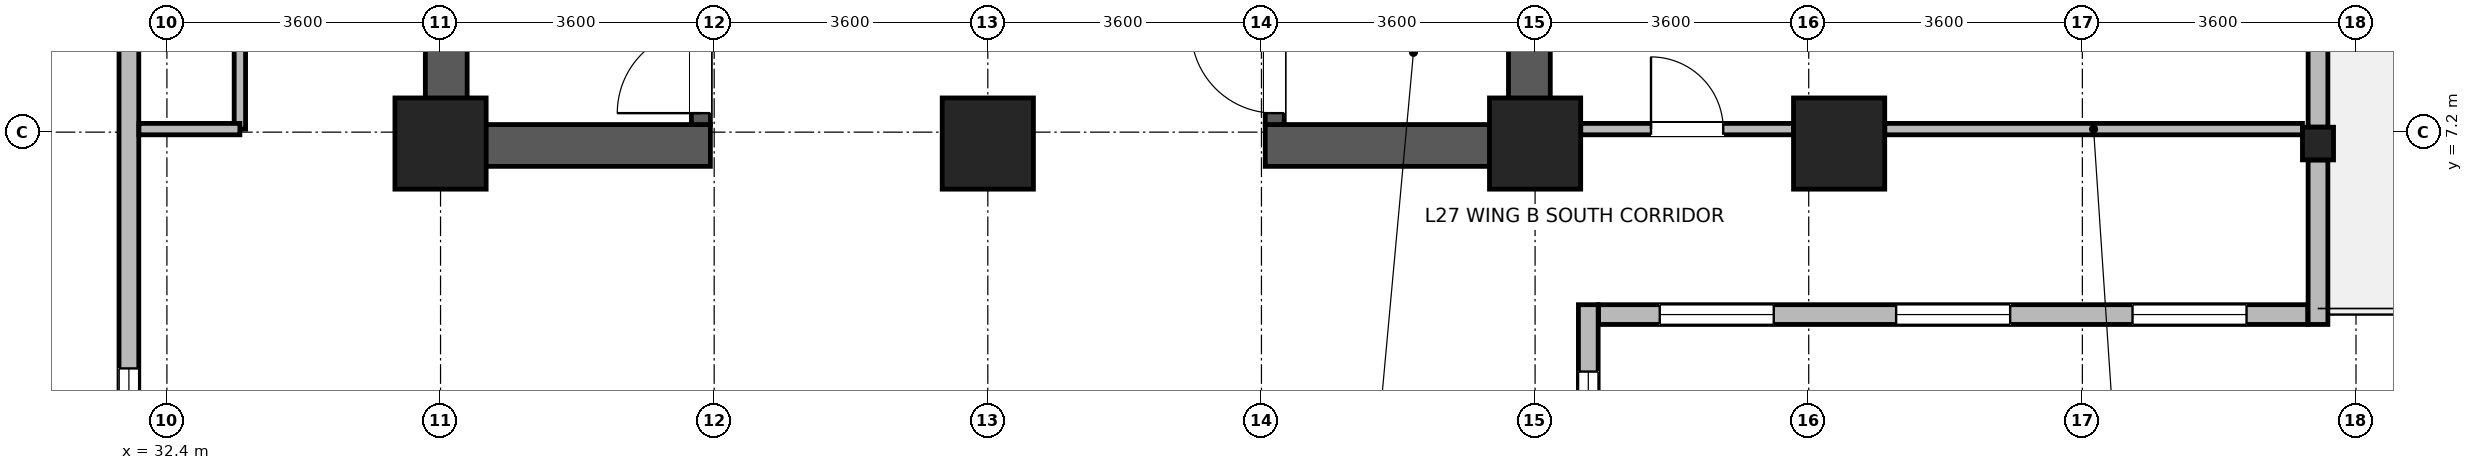
"""IFC4 building model, lengths in metres.
Left out: names, types, materials, properties, quantities, classifications, styles, units other than length and angle.
Written with IfcOpenShell. Run it as: python <this file> out.ifc"""

import sys

from ifc_helpers import new_model, si_unit, direction, frame, frame_2d, origin, origin_2d, place, context, subcontext, project, spatial, rectangle, i_section, extrude, source, transform, mapped, element, fill, save


model = new_model("IFC4")
c1 = context("Model", 3, precision=1e-05, world=origin(), true_north=direction((0.0, 1.0)))
c2 = subcontext(c1, "Body", "Model", "MODEL_VIEW")
j1 = project(units=[si_unit("LENGTHUNIT", "METRE"), si_unit("PLANEANGLEUNIT", "RADIAN")], contexts=[c1])
p1 = place(None, origin())
s1 = spatial("IfcSite", under=j1, at=p1, CompositionType="ELEMENT")
p2 = place(p1, origin())
s2 = spatial("IfcBuilding", under=s1, at=p2, CompositionType="ELEMENT")
p3 = place(p2, frame((0.0, 0.0, 108.2)))
s3 = spatial("IfcBuildingStorey", under=s2, at=p3, CompositionType="ELEMENT", Elevation=108.2)
for number, where, z_axis, x_axis in (
    (1, (36.075, 6.75, 0.0), (0.0, 0.0, 1.0), (0.0, 1.0, 0.0)),
    (2, (50.325, 6.75, 0.0), (0.0, 0.0, 1.0), (0.0, 1.0, 0.0)),
):
    element("IfcWall", number, at=place(p3, frame(where, z_axis=z_axis, x_axis=x_axis)), inside=s3, PredefinedType="SHEAR", context=c2, shape_type="SweptSolid", body=[
        extrude(rectangle(XDim=8.1, YDim=0.55, at=frame_2d((4.05, 0.0))), origin(), (0.0, 0.0, 1.0), 3.45),
    ])
for number, where, z_axis, x_axis in (
    (3, (36.35, 7.025, 0.0), (0.0, 0.0, 1.0), (1.0, 0.0, 0.0)),
    (4, (46.85, 7.025, 0.0), (0.0, 0.0, 1.0), (1.0, 0.0, 0.0)),
):
    element("IfcWall", number, at=place(p3, frame(where, z_axis=z_axis, x_axis=x_axis)), inside=s3, PredefinedType="SHEAR", context=c2, shape_type="SweptSolid", body=[
        extrude(rectangle(XDim=3.2, YDim=0.55, at=frame_2d((1.6, 0.0))), origin(), (0.0, 0.0, 1.0), 3.45),
    ])
p4 = place(p3, frame((39.425, 7.3, 0.0), z_axis=(0.0, 0.0, 1.0), x_axis=(0.0, 1.0, 0.0)))
e5 = element("IfcWall", 5, at=p4, inside=s3, PredefinedType="SHEAR", context=c2, shape_type="SweptSolid", body=[
    extrude(rectangle(XDim=7.0, YDim=0.25, at=frame_2d((3.5, 0.0))), origin(), (0.0, 0.0, 1.0), 3.45),
])
p5 = place(p4, frame((0.15, 0.0, 0.0)))
e6 = element("IfcOpeningElement", 6, at=p5, cuts=e5, PredefinedType="OPENING", context=c2, shape_type="SweptSolid", body=[
    extrude(rectangle(XDim=1.1, YDim=2.08, at=frame_2d((0.55, 1.04))), frame((0.0, 0.135, 0.0), z_axis=(0.0, -1.0, 0.0), x_axis=(1.0, 0.0, 0.0)), (0.0, 0.0, 1.0), 0.27),
])
p6 = place(p3, frame((46.975, 7.3, 0.0), z_axis=(0.0, 0.0, 1.0), x_axis=(0.0, 1.0, 0.0)))
e7 = element("IfcWall", 7, at=p6, inside=s3, PredefinedType="SHEAR", context=c2, shape_type="SweptSolid", body=[
    extrude(rectangle(XDim=7.0, YDim=0.25, at=frame_2d((3.5, 0.0))), origin(), (0.0, 0.0, 1.0), 3.45),
])
p7 = place(p6, frame((0.15, 0.0, 0.0)))
e8 = element("IfcOpeningElement", 8, at=p7, cuts=e7, PredefinedType="OPENING", context=c2, shape_type="SweptSolid", body=[
    extrude(rectangle(XDim=1.1, YDim=2.08, at=frame_2d((0.55, 1.04))), frame((0.0, 0.135, 0.0), z_axis=(0.0, -1.0, 0.0), x_axis=(1.0, 0.0, 0.0)), (0.0, 0.0, 1.0), 0.27),
])
m1 = source(origin(), c2, "Body", "SweptSolid", [
    extrude(rectangle(XDim=1.2, YDim=1.2, at=origin_2d()), origin(), (0.0, 0.0, 1.0), 3.7),
])
for number, where, z_axis, x_axis in (
    (9, (36.0, 7.05, 0.0), (0.0, 0.0, 1.0), (1.0, 0.0, 0.0)),
    (10, (43.2, 7.05, 0.0), (0.0, 0.0, 1.0), (1.0, 0.0, 0.0)),
    (11, (50.4, 7.05, 0.0), (0.0, 0.0, 1.0), (1.0, 0.0, 0.0)),
    (12, (54.4, 7.05, 0.0), (0.0, 0.0, 1.0), (1.0, 0.0, 0.0)),
):
    element("IfcColumn", number, at=place(p3, frame(where, z_axis=z_axis, x_axis=x_axis)), inside=s3, PredefinedType="COLUMN", context=c2, shape_type="MappedRepresentation", body=[
        mapped(m1, transform((0.0, 0.0, 0.0), x_axis=(1.0, 0.0, 0.0), y_axis=(0.0, 1.0, 0.0), z_axis=(0.0, 0.0, 1.0), scale=1.0)),
    ])
m2 = source(origin(), c2, "Body", "SweptSolid", [
    extrude(i_section(OverallWidth=0.409, OverallDepth=0.43, WebThickness=0.024, FlangeThickness=0.033, FilletRadius=0.015, at=origin_2d()), origin(), (0.0, 0.0, 1.0), 3.7),
])
p8 = place(p3, frame((60.7, 7.05, 0.0), z_axis=(0.0, 0.0, 1.0), x_axis=(1.0, 0.0, 0.0)))
e13 = element("IfcColumn", 13, at=p8, inside=s3, PredefinedType="COLUMN", context=c2, shape_type="MappedRepresentation", body=[
    mapped(m2, transform((0.0, 0.0, 0.0), x_axis=(1.0, 0.0, 0.0), y_axis=(0.0, 1.0, 0.0), z_axis=(0.0, 0.0, 1.0), scale=1.0)),
])
p9 = place(p3, frame((51.1, 4.93, 0.0), z_axis=(0.0, 0.0, 1.0), x_axis=(0.0, -1.0, 0.0)))
e14 = element("IfcWall", 14, at=p9, inside=s3, PredefinedType="STANDARD", context=c2, shape_type="SweptSolid", body=[
    extrude(rectangle(XDim=3.26, YDim=0.26, at=frame_2d((1.63, 0.0))), origin(), (0.0, 0.0, 1.0), 3.43),
])
p10 = place(p9, frame((0.88, 0.0, 0.85)))
e15 = element("IfcOpeningElement", 15, at=p10, cuts=e14, PredefinedType="OPENING", context=c2, shape_type="SweptSolid", body=[
    extrude(rectangle(XDim=1.5, YDim=1.85, at=frame_2d((0.75, 0.925))), frame((0.0, 0.14, 0.0), z_axis=(0.0, -1.0, 0.0), x_axis=(1.0, 0.0, 0.0)), (0.0, 0.0, 1.0), 0.28),
])
p11 = place(p3, frame((60.565, 4.8, 0.0), z_axis=(0.0, 0.0, 1.0), x_axis=(-1.0, 0.0, 0.0)))
e16 = element("IfcWall", 16, at=p11, inside=s3, PredefinedType="STANDARD", context=c2, shape_type="SweptSolid", body=[
    extrude(rectangle(XDim=9.33, YDim=0.26, at=frame_2d((4.665, 0.0))), origin(), (0.0, 0.0, 1.0), 3.43),
])
p12 = place(p11, frame((0.805, 0.0, 0.85)))
e17 = element("IfcOpeningElement", 17, at=p12, cuts=e16, PredefinedType="OPENING", context=c2, shape_type="SweptSolid", body=[
    extrude(rectangle(XDim=1.5, YDim=1.85, at=frame_2d((0.75, 0.925))), frame((0.0, 0.14, 0.0), z_axis=(0.0, -1.0, 0.0), x_axis=(1.0, 0.0, 0.0)), (0.0, 0.0, 1.0), 0.28),
])
p13 = place(p11, frame((3.915, 0.0, 0.85)))
e18 = element("IfcOpeningElement", 18, at=p13, cuts=e16, PredefinedType="OPENING", context=c2, shape_type="SweptSolid", body=[
    extrude(rectangle(XDim=1.5, YDim=1.85, at=frame_2d((0.75, 0.925))), frame((0.0, 0.14, 0.0), z_axis=(0.0, -1.0, 0.0), x_axis=(1.0, 0.0, 0.0)), (0.0, 0.0, 1.0), 0.28),
])
p14 = place(p11, frame((7.025, 0.0, 0.85)))
e19 = element("IfcOpeningElement", 19, at=p14, cuts=e16, PredefinedType="OPENING", context=c2, shape_type="SweptSolid", body=[
    extrude(rectangle(XDim=1.5, YDim=1.85, at=frame_2d((0.75, 0.925))), frame((0.0, 0.14, 0.0), z_axis=(0.0, -1.0, 0.0), x_axis=(1.0, 0.0, 0.0)), (0.0, 0.0, 1.0), 0.28),
])
p15 = place(p3, frame((60.7, 6.834, 0.0), z_axis=(0.0, 0.0, 1.0), x_axis=(0.0, -1.0, 0.0)))
e20 = element("IfcWall", 20, at=p15, inside=s3, PredefinedType="STANDARD", context=c2, shape_type="SweptSolid", body=[
    extrude(rectangle(XDim=2.164, YDim=0.26, at=frame_2d((1.082, 0.0))), origin(), (0.0, 0.0, 1.0), 3.43),
])
p16 = place(p3, frame((60.7, 14.334, 0.0), z_axis=(0.0, 0.0, 1.0), x_axis=(0.0, -1.0, 0.0)))
e21 = element("IfcWall", 21, at=p16, inside=s3, PredefinedType="STANDARD", context=c2, shape_type="SweptSolid", body=[
    extrude(rectangle(XDim=7.068, YDim=0.26, at=frame_2d((3.534, 0.0))), origin(), (0.0, 0.0, 1.0), 2.98),
])
p17 = place(p16, frame((2.784, 0.0, 0.0)))
e22 = element("IfcOpeningElement", 22, at=p17, cuts=e21, PredefinedType="OPENING", context=c2, shape_type="SweptSolid", body=[
    extrude(rectangle(XDim=1.5, YDim=2.15, at=frame_2d((0.75, 1.075))), frame((0.0, 0.14, 0.0), z_axis=(0.0, -1.0, 0.0), x_axis=(1.0, 0.0, 0.0)), (0.0, 0.0, 1.0), 0.28),
])
p18 = place(p16, frame((1.017, 0.0, 0.85)))
e23 = element("IfcOpeningElement", 23, at=p18, cuts=e21, PredefinedType="OPENING", context=c2, shape_type="SweptSolid", body=[
    extrude(rectangle(XDim=1.5, YDim=1.85, at=frame_2d((0.75, 0.925))), frame((0.0, 0.14, 0.0), z_axis=(0.0, -1.0, 0.0), x_axis=(1.0, 0.0, 0.0)), (0.0, 0.0, 1.0), 0.28),
])
p19 = place(p16, frame((4.551, 0.0, 0.85)))
e24 = element("IfcOpeningElement", 24, at=p19, cuts=e21, PredefinedType="OPENING", context=c2, shape_type="SweptSolid", body=[
    extrude(rectangle(XDim=1.5, YDim=1.85, at=frame_2d((0.75, 0.925))), frame((0.0, 0.14, 0.0), z_axis=(0.0, -1.0, 0.0), x_axis=(1.0, 0.0, 0.0)), (0.0, 0.0, 1.0), 0.28),
])
p20 = place(p3, frame((31.9, 1.67, 0.0), z_axis=(0.0, 0.0, 1.0), x_axis=(0.0, 1.0, 0.0)))
e25 = element("IfcWall", 25, at=p20, inside=s3, PredefinedType="STANDARD", context=c2, shape_type="SweptSolid", body=[
    extrude(rectangle(XDim=20.06, YDim=0.26, at=frame_2d((10.03, 0.0))), origin(), (0.0, 0.0, 1.0), 3.43),
])
p21 = place(p20, frame((0.922, 0.0, 0.85)))
e26 = element("IfcOpeningElement", 26, at=p21, cuts=e25, PredefinedType="OPENING", context=c2, shape_type="SweptSolid", body=[
    extrude(rectangle(XDim=1.5, YDim=1.85, at=frame_2d((0.75, 0.925))), frame((0.0, 0.14, 0.0), z_axis=(0.0, -1.0, 0.0), x_axis=(1.0, 0.0, 0.0)), (0.0, 0.0, 1.0), 0.28),
])
p22 = place(p20, frame((7.608, 0.0, 0.85)))
e27 = element("IfcOpeningElement", 27, at=p22, cuts=e25, PredefinedType="OPENING", context=c2, shape_type="SweptSolid", body=[
    extrude(rectangle(XDim=1.5, YDim=1.85, at=frame_2d((0.75, 0.925))), frame((0.0, 0.14, 0.0), z_axis=(0.0, -1.0, 0.0), x_axis=(1.0, 0.0, 0.0)), (0.0, 0.0, 1.0), 0.28),
])
p23 = place(p20, frame((10.952, 0.0, 0.85)))
e28 = element("IfcOpeningElement", 28, at=p23, cuts=e25, PredefinedType="OPENING", context=c2, shape_type="SweptSolid", body=[
    extrude(rectangle(XDim=1.5, YDim=1.85, at=frame_2d((0.75, 0.925))), frame((0.0, 0.14, 0.0), z_axis=(0.0, -1.0, 0.0), x_axis=(1.0, 0.0, 0.0)), (0.0, 0.0, 1.0), 0.28),
])
p24 = place(p20, frame((14.295, 0.0, 0.85)))
e29 = element("IfcOpeningElement", 29, at=p24, cuts=e25, PredefinedType="OPENING", context=c2, shape_type="SweptSolid", body=[
    extrude(rectangle(XDim=1.5, YDim=1.85, at=frame_2d((0.75, 0.925))), frame((0.0, 0.14, 0.0), z_axis=(0.0, -1.0, 0.0), x_axis=(1.0, 0.0, 0.0)), (0.0, 0.0, 1.0), 0.28),
])
p25 = place(p20, frame((17.638, 0.0, 0.85)))
e30 = element("IfcOpeningElement", 30, at=p25, cuts=e25, PredefinedType="OPENING", context=c2, shape_type="SweptSolid", body=[
    extrude(rectangle(XDim=1.5, YDim=1.85, at=frame_2d((0.75, 0.925))), frame((0.0, 0.14, 0.0), z_axis=(0.0, -1.0, 0.0), x_axis=(1.0, 0.0, 0.0)), (0.0, 0.0, 1.0), 0.28),
])
p26 = place(p3, frame((51.0, 7.24, 0.0), z_axis=(0.0, 0.0, 1.0), x_axis=(1.0, 0.0, 0.0)))
e31 = element("IfcWall", 31, at=p26, inside=s3, PredefinedType="PARTITIONING", context=c2, shape_type="SweptSolid", body=[
    extrude(rectangle(XDim=2.8, YDim=0.15, at=frame_2d((1.4, 0.0))), origin(), (0.0, 0.0, 1.0), 2.78),
])
p27 = place(p26, frame((0.925, 0.0, 0.0)))
e32 = element("IfcOpeningElement", 32, at=p27, cuts=e31, PredefinedType="OPENING", context=c2, shape_type="SweptSolid", body=[
    extrude(rectangle(XDim=0.95, YDim=2.1, at=frame_2d((0.475, 1.05))), frame((0.0, 0.085, 0.0), z_axis=(0.0, -1.0, 0.0), x_axis=(1.0, 0.0, 0.0)), (0.0, 0.0, 1.0), 0.17),
])
p28 = place(p3, frame((55.0, 7.24, 0.0), z_axis=(0.0, 0.0, 1.0), x_axis=(1.0, 0.0, 0.0)))
e33 = element("IfcWall", 33, at=p28, inside=s3, PredefinedType="PARTITIONING", context=c2, shape_type="SweptSolid", body=[
    extrude(rectangle(XDim=5.496, YDim=0.15, at=frame_2d((2.748, 0.0))), origin(), (0.0, 0.0, 1.0), 2.78),
])
p29 = place(p3, frame((33.36, 7.24, 0.0), z_axis=(0.0, 0.0, 1.0), x_axis=(0.0, 1.0, 0.0)))
e34 = element("IfcWall", 34, at=p29, inside=s3, PredefinedType="PARTITIONING", context=c2, shape_type="SweptSolid", body=[
    extrude(rectangle(XDim=7.26, YDim=0.15, at=frame_2d((3.63, 0.0))), origin(), (0.0, 0.0, 1.0), 3.43),
])
p30 = place(p29, frame((2.98, 0.0, 0.0)))
e35 = element("IfcOpeningElement", 35, at=p30, cuts=e34, PredefinedType="OPENING", context=c2, shape_type="SweptSolid", body=[
    extrude(rectangle(XDim=1.3, YDim=2.12, at=frame_2d((0.65, 1.06))), frame((0.0, 0.085, 0.0), z_axis=(0.0, -1.0, 0.0), x_axis=(1.0, 0.0, 0.0)), (0.0, 0.0, 1.0), 0.17),
])
p31 = place(p3, frame((32.032, 7.24, 0.0), z_axis=(0.0, 0.0, 1.0), x_axis=(1.0, 0.0, 0.0)))
e36 = element("IfcWall", 36, at=p31, inside=s3, PredefinedType="PARTITIONING", context=c2, shape_type="SweptSolid", body=[
    extrude(rectangle(XDim=1.328, YDim=0.15, at=frame_2d((0.664, 0.0))), origin(), (0.0, 0.0, 1.0), 3.43),
])
p32 = place(p10, origin())
e37 = element("IfcWindow", 37, at=p32, inside=s3, PartitioningType="SINGLE_PANEL", PredefinedType="WINDOW", context=c2, shape_type="SweptSolid", body=[
    extrude(rectangle(XDim=1.5, YDim=1.85, at=frame_2d((0.75, 0.925))), frame((0.0, 0.03, 0.0), z_axis=(0.0, -1.0, 0.0), x_axis=(1.0, 0.0, 0.0)), (0.0, 0.0, 1.0), 0.06),
])
fill(e15, e37)
p33 = place(p12, origin())
e38 = element("IfcWindow", 38, at=p33, inside=s3, PartitioningType="SINGLE_PANEL", PredefinedType="WINDOW", context=c2, shape_type="SweptSolid", body=[
    extrude(rectangle(XDim=1.5, YDim=1.85, at=frame_2d((0.75, 0.925))), frame((0.0, 0.03, 0.0), z_axis=(0.0, -1.0, 0.0), x_axis=(1.0, 0.0, 0.0)), (0.0, 0.0, 1.0), 0.06),
])
fill(e17, e38)
p34 = place(p13, origin())
e39 = element("IfcWindow", 39, at=p34, inside=s3, PartitioningType="SINGLE_PANEL", PredefinedType="WINDOW", context=c2, shape_type="SweptSolid", body=[
    extrude(rectangle(XDim=1.5, YDim=1.85, at=frame_2d((0.75, 0.925))), frame((0.0, 0.03, 0.0), z_axis=(0.0, -1.0, 0.0), x_axis=(1.0, 0.0, 0.0)), (0.0, 0.0, 1.0), 0.06),
])
fill(e18, e39)
p35 = place(p14, origin())
e40 = element("IfcWindow", 40, at=p35, inside=s3, PartitioningType="SINGLE_PANEL", PredefinedType="WINDOW", context=c2, shape_type="SweptSolid", body=[
    extrude(rectangle(XDim=1.5, YDim=1.85, at=frame_2d((0.75, 0.925))), frame((0.0, 0.03, 0.0), z_axis=(0.0, -1.0, 0.0), x_axis=(1.0, 0.0, 0.0)), (0.0, 0.0, 1.0), 0.06),
])
fill(e19, e40)
p36 = place(p21, origin())
e41 = element("IfcWindow", 41, at=p36, inside=s3, PartitioningType="SINGLE_PANEL", PredefinedType="WINDOW", context=c2, shape_type="SweptSolid", body=[
    extrude(rectangle(XDim=1.5, YDim=1.85, at=frame_2d((0.75, 0.925))), frame((0.0, 0.03, 0.0), z_axis=(0.0, -1.0, 0.0), x_axis=(1.0, 0.0, 0.0)), (0.0, 0.0, 1.0), 0.06),
])
fill(e26, e41)
p37 = place(p5, origin())
e42 = element("IfcDoor", 42, at=p37, inside=s3, OperationType="SINGLE_SWING_LEFT", PredefinedType="DOOR", context=c2, shape_type="SweptSolid", body=[
    extrude(rectangle(XDim=1.1, YDim=2.08, at=frame_2d((0.55, 1.04))), frame((0.0, 0.025, 0.0), z_axis=(0.0, -1.0, 0.0), x_axis=(1.0, 0.0, 0.0)), (0.0, 0.0, 1.0), 0.05),
])
fill(e6, e42)
p38 = place(p7, origin())
e43 = element("IfcDoor", 43, at=p38, inside=s3, OperationType="SINGLE_SWING_RIGHT", PredefinedType="DOOR", context=c2, shape_type="SweptSolid", body=[
    extrude(rectangle(XDim=1.1, YDim=2.08, at=frame_2d((0.55, 1.04))), frame((0.0, 0.025, 0.0), z_axis=(0.0, -1.0, 0.0), x_axis=(1.0, 0.0, 0.0)), (0.0, 0.0, 1.0), 0.05),
])
fill(e8, e43)
p39 = place(p27, origin())
e44 = element("IfcDoor", 44, at=p39, inside=s3, OperationType="SINGLE_SWING_LEFT", PredefinedType="DOOR", context=c2, shape_type="SweptSolid", body=[
    extrude(rectangle(XDim=0.95, YDim=2.1, at=frame_2d((0.475, 1.05))), frame((0.0, 0.025, 0.0), z_axis=(0.0, -1.0, 0.0), x_axis=(1.0, 0.0, 0.0)), (0.0, 0.0, 1.0), 0.05),
])
fill(e32, e44)
save(model, sys.argv[1])
